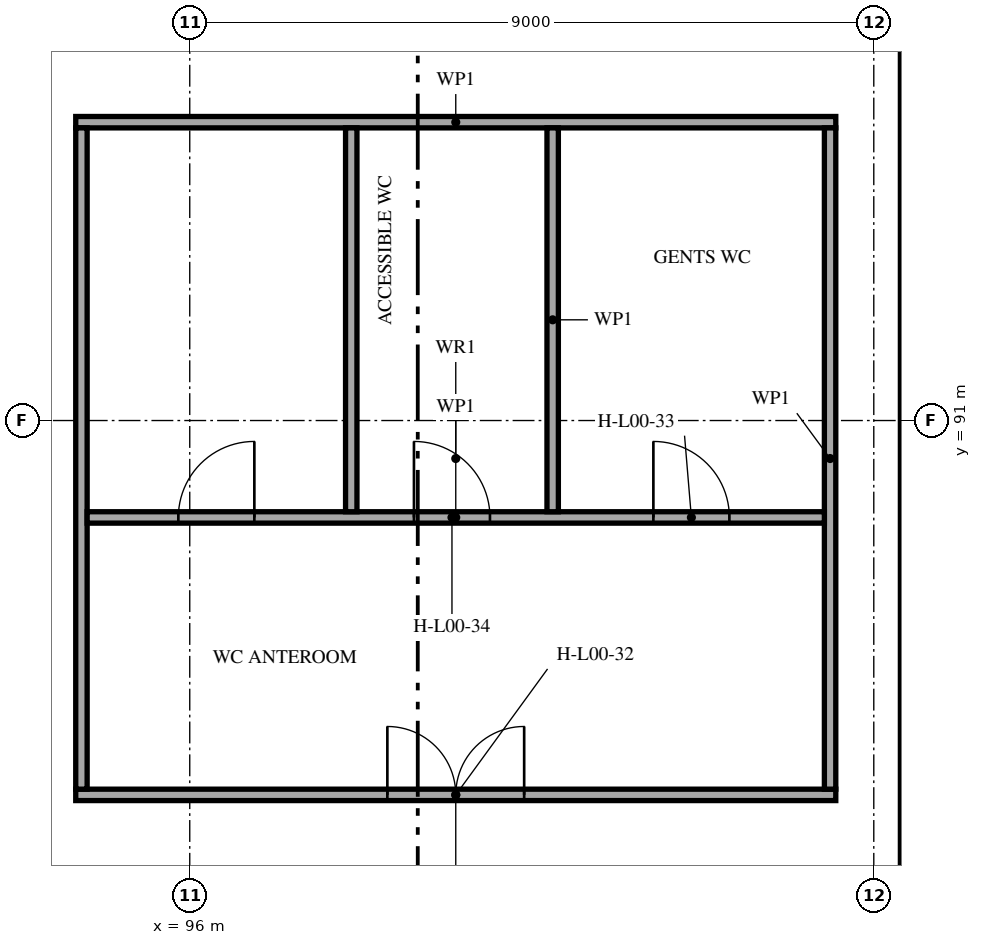
"""IFC4 building model, lengths in metres.
Left out: names, types, materials, properties, quantities, classifications, styles, units other than length and angle.
Written with IfcOpenShell. Run it as: python <this file> out.ifc"""

import sys

from ifc_helpers import new_model, si_unit, direction, frame, frame_2d, origin, place, context, subcontext, project, spatial, rectangle, extrude, element, fill, save


model = new_model("IFC4")
c1 = context("Model", 3, precision=1e-05, world=origin(), true_north=direction((0.0, 1.0)))
c2 = subcontext(c1, "Body", "Model", "MODEL_VIEW")
j1 = project(units=[si_unit("LENGTHUNIT", "METRE"), si_unit("PLANEANGLEUNIT", "RADIAN")], contexts=[c1])
p1 = place(None, origin())
s1 = spatial("IfcSite", under=j1, at=p1, CompositionType="ELEMENT")
p2 = place(p1, origin())
s2 = spatial("IfcBuilding", under=s1, at=p2, CompositionType="ELEMENT")
p3 = place(p2, origin())
s3 = spatial("IfcBuildingStorey", under=s2, at=p3, CompositionType="ELEMENT", Elevation=0.0)
p4 = place(p3, frame((105.575, 46.75, 0.0), z_axis=(0.0, 0.0, 1.0), x_axis=(0.0, 1.0, 0.0)))
e1 = element("IfcWall", 1, at=p4, inside=s3, PredefinedType="SOLIDWALL", context=c2, shape_type="SweptSolid", body=[
    extrude(rectangle(XDim=61.65, YDim=0.45, at=frame_2d((30.825, 0.0))), origin(), (0.0, 0.0, 1.0), 5.0),
])
p5 = place(p3, frame((94.5, 86.075, 0.0), z_axis=(0.0, 0.0, 1.0), x_axis=(1.0, 0.0, 0.0)))
e2 = element("IfcWall", 2, at=p5, inside=s3, PredefinedType="SOLIDWALL", context=c2, shape_type="SweptSolid", body=[
    extrude(rectangle(XDim=10.0, YDim=0.15, at=frame_2d((5.0, 0.0))), origin(), (0.0, 0.0, 1.0), 3.45),
])
p6 = place(p5, frame((4.1, 0.0, 0.0)))
e3 = element("IfcOpeningElement", 3, at=p6, cuts=e2, PredefinedType="OPENING", context=c2, shape_type="SweptSolid", body=[
    extrude(rectangle(XDim=1.8, YDim=2.1, at=frame_2d((0.9, 1.05))), frame((0.0, 0.085, 0.0), z_axis=(0.0, -1.0, 0.0), x_axis=(1.0, 0.0, 0.0)), (0.0, 0.0, 1.0), 0.17),
])
p7 = place(p3, frame((94.5, 94.925, 0.0), z_axis=(0.0, 0.0, 1.0), x_axis=(1.0, 0.0, 0.0)))
e4 = element("IfcWall", 4, at=p7, inside=s3, PredefinedType="SOLIDWALL", context=c2, shape_type="SweptSolid", body=[
    extrude(rectangle(XDim=10.0, YDim=0.15, at=frame_2d((5.0, 0.0))), origin(), (0.0, 0.0, 1.0), 3.45),
])
for number, where, z_axis, x_axis in (
    (5, (104.425, 86.15, 0.0), (0.0, 0.0, 1.0), (0.0, 1.0, 0.0)),
    (6, (94.575, 86.15, 0.0), (0.0, 0.0, 1.0), (0.0, 1.0, 0.0)),
):
    element("IfcWall", number, at=place(p3, frame(where, z_axis=z_axis, x_axis=x_axis)), inside=s3, PredefinedType="SOLIDWALL", context=c2, shape_type="SweptSolid", body=[
        extrude(rectangle(XDim=8.7, YDim=0.15, at=frame_2d((4.35, 0.0))), origin(), (0.0, 0.0, 1.0), 3.45),
    ])
p8 = place(p3, frame((94.65, 89.725, 0.0), z_axis=(0.0, 0.0, 1.0), x_axis=(1.0, 0.0, 0.0)))
e7 = element("IfcWall", 7, at=p8, inside=s3, PredefinedType="SOLIDWALL", context=c2, shape_type="SweptSolid", body=[
    extrude(rectangle(XDim=9.7, YDim=0.15, at=frame_2d((4.85, 0.0))), origin(), (0.0, 0.0, 1.0), 3.45),
])
p9 = place(p8, frame((7.45, 0.0, 0.0)))
e8 = element("IfcOpeningElement", 8, at=p9, cuts=e7, PredefinedType="OPENING", context=c2, shape_type="SweptSolid", body=[
    extrude(rectangle(XDim=1.0, YDim=2.1, at=frame_2d((0.5, 1.05))), frame((0.0, 0.085, 0.0), z_axis=(0.0, -1.0, 0.0), x_axis=(1.0, 0.0, 0.0)), (0.0, 0.0, 1.0), 0.17),
])
p10 = place(p8, frame((4.3, 0.0, 0.0)))
e9 = element("IfcOpeningElement", 9, at=p10, cuts=e7, PredefinedType="OPENING", context=c2, shape_type="SweptSolid", body=[
    extrude(rectangle(XDim=1.0, YDim=2.1, at=frame_2d((0.5, 1.05))), frame((0.0, 0.085, 0.0), z_axis=(0.0, -1.0, 0.0), x_axis=(1.0, 0.0, 0.0)), (0.0, 0.0, 1.0), 0.17),
])
p11 = place(p8, frame((1.2, 0.0, 0.0)))
e10 = element("IfcOpeningElement", 10, at=p11, cuts=e7, PredefinedType="OPENING", context=c2, shape_type="SweptSolid", body=[
    extrude(rectangle(XDim=1.0, YDim=2.1, at=frame_2d((0.5, 1.05))), frame((0.0, 0.085, 0.0), z_axis=(0.0, -1.0, 0.0), x_axis=(1.0, 0.0, 0.0)), (0.0, 0.0, 1.0), 0.17),
])
for number, where, z_axis, x_axis in (
    (11, (100.775, 89.8, 0.0), (0.0, 0.0, 1.0), (0.0, 1.0, 0.0)),
    (12, (98.125, 89.8, 0.0), (0.0, 0.0, 1.0), (0.0, 1.0, 0.0)),
):
    element("IfcWall", number, at=place(p3, frame(where, z_axis=z_axis, x_axis=x_axis)), inside=s3, PredefinedType="SOLIDWALL", context=c2, shape_type="SweptSolid", body=[
        extrude(rectangle(XDim=5.05, YDim=0.15, at=frame_2d((2.525, 0.0))), origin(), (0.0, 0.0, 1.0), 3.45),
    ])
p12 = place(p6, origin())
e13 = element("IfcDoor", 13, at=p12, inside=s3, OperationType="DOUBLE_DOOR_SINGLE_SWING", PredefinedType="DOOR", context=c2, shape_type="SweptSolid", body=[
    extrude(rectangle(XDim=1.8, YDim=2.1, at=frame_2d((0.9, 1.05))), frame((0.0, 0.025, 0.0), z_axis=(0.0, -1.0, 0.0), x_axis=(1.0, 0.0, 0.0)), (0.0, 0.0, 1.0), 0.05),
])
fill(e3, e13)
p13 = place(p9, origin())
e14 = element("IfcDoor", 14, at=p13, inside=s3, OperationType="SINGLE_SWING_LEFT", PredefinedType="DOOR", context=c2, shape_type="SweptSolid", body=[
    extrude(rectangle(XDim=1.0, YDim=2.1, at=frame_2d((0.5, 1.05))), frame((0.0, 0.025, 0.0), z_axis=(0.0, -1.0, 0.0), x_axis=(1.0, 0.0, 0.0)), (0.0, 0.0, 1.0), 0.05),
])
fill(e8, e14)
p14 = place(p10, origin())
e15 = element("IfcDoor", 15, at=p14, inside=s3, OperationType="SINGLE_SWING_LEFT", PredefinedType="DOOR", context=c2, shape_type="SweptSolid", body=[
    extrude(rectangle(XDim=1.0, YDim=2.1, at=frame_2d((0.5, 1.05))), frame((0.0, 0.025, 0.0), z_axis=(0.0, -1.0, 0.0), x_axis=(1.0, 0.0, 0.0)), (0.0, 0.0, 1.0), 0.05),
])
fill(e9, e15)
p15 = place(p11, origin())
e16 = element("IfcDoor", 16, at=p15, inside=s3, OperationType="SINGLE_SWING_RIGHT", PredefinedType="DOOR", context=c2, shape_type="SweptSolid", body=[
    extrude(rectangle(XDim=1.0, YDim=2.1, at=frame_2d((0.5, 1.05))), frame((0.0, 0.025, 0.0), z_axis=(0.0, -1.0, 0.0), x_axis=(1.0, 0.0, 0.0)), (0.0, 0.0, 1.0), 0.05),
])
fill(e10, e16)
save(model, sys.argv[1])
